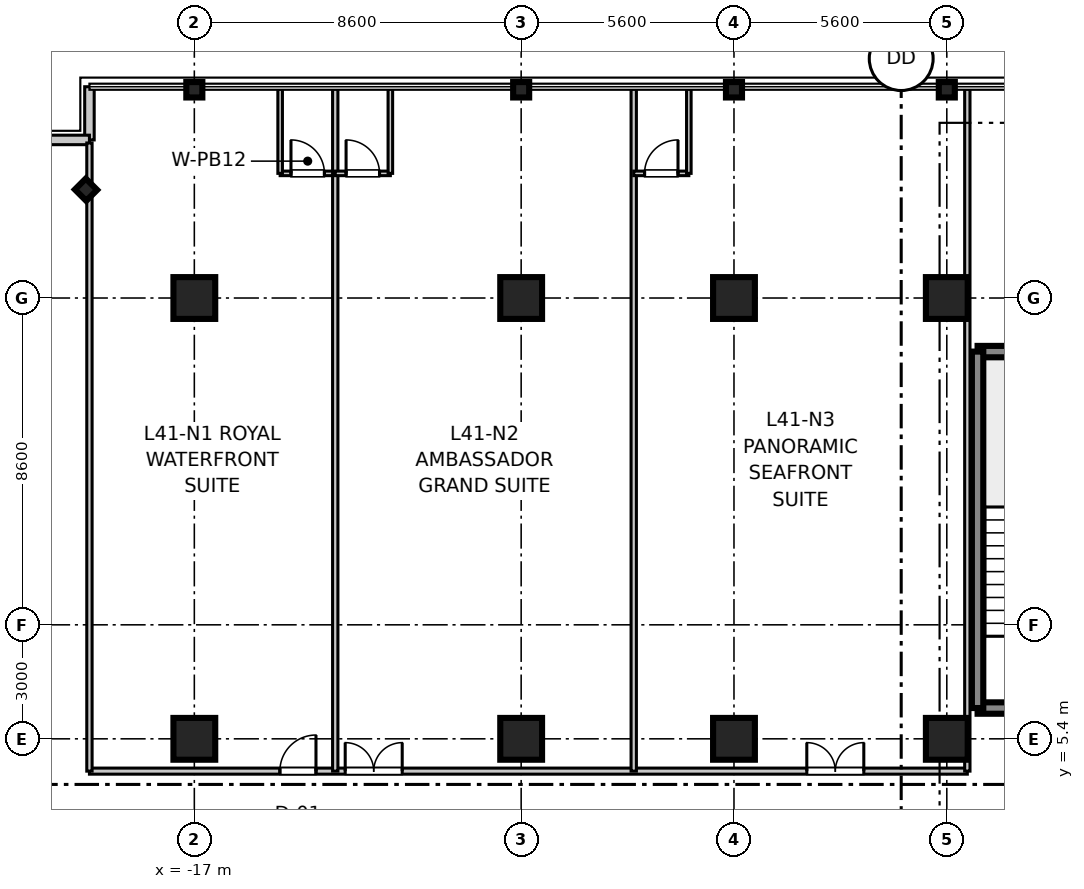
"""IFC4 building model, lengths in metres.
Left out: names, types, materials, properties, quantities, classifications, styles, units other than length and angle.
Written with IfcOpenShell. Run it as: python <this file> out.ifc"""

import sys

from ifc_helpers import new_model, si_unit, direction, frame, frame_2d, origin, origin_2d, place, context, subcontext, project, spatial, rectangle, i_section, extrude, source, transform, mapped, element, fill, save


model = new_model("IFC4")
c1 = context("Model", 3, precision=1e-05, world=origin(), true_north=direction((0.0, 1.0)))
c2 = subcontext(c1, "Body", "Model", "MODEL_VIEW")
j1 = project(units=[si_unit("LENGTHUNIT", "METRE"), si_unit("PLANEANGLEUNIT", "RADIAN")], contexts=[c1])
p1 = place(None, origin())
s1 = spatial("IfcSite", under=j1, at=p1, CompositionType="ELEMENT")
p2 = place(p1, origin())
s2 = spatial("IfcBuilding", under=s1, at=p2, CompositionType="ELEMENT")
p3 = place(p2, frame((0.0, 0.0, 163.6)))
s3 = spatial("IfcBuildingStorey", under=s2, at=p3, CompositionType="ELEMENT", Elevation=163.6)
m1 = source(origin(), c2, "Body", "SweptSolid", [
    extrude(rectangle(XDim=1.1, YDim=1.1, at=origin_2d()), origin(), (0.0, 0.0, 1.0), 3.605),
])
for number, where, z_axis, x_axis in (
    (1, (-17.0, 5.4, 0.0), (0.0, 0.0, 1.0), (1.0, 0.0, 0.0)),
    (2, (-17.0, 17.0, 0.0), (0.0, 0.0, 1.0), (1.0, 0.0, 0.0)),
    (3, (-8.4, 5.4, 0.0), (0.0, 0.0, 1.0), (1.0, 0.0, 0.0)),
    (4, (-8.4, 17.0, 0.0), (0.0, 0.0, 1.0), (1.0, 0.0, 0.0)),
    (5, (-2.8, 5.4, 0.0), (0.0, 0.0, 1.0), (1.0, 0.0, 0.0)),
    (6, (-2.8, 17.0, 0.0), (0.0, 0.0, 1.0), (1.0, 0.0, 0.0)),
    (7, (2.8, 5.4, 0.0), (0.0, 0.0, 1.0), (1.0, 0.0, 0.0)),
    (8, (2.8, 17.0, 0.0), (0.0, 0.0, 1.0), (1.0, 0.0, 0.0)),
):
    element("IfcColumn", number, at=place(p3, frame(where, z_axis=z_axis, x_axis=x_axis)), inside=s3, PredefinedType="COLUMN", context=c2, shape_type="MappedRepresentation", body=[
        mapped(m1, transform((0.0, 0.0, 0.0), scale=1.0)),
    ])
m2 = source(origin(), c2, "Body", "SweptSolid", [
    extrude(i_section(OverallWidth=0.406, OverallDepth=0.422, WebThickness=0.019, FlangeThickness=0.03, at=origin_2d()), origin(), (0.0, 0.0, 1.0), 3.605),
])
for number, where, z_axis, x_axis in (
    (9, (-17.0, 22.48, 0.0), (0.0, 0.0, 1.0), (0.0, 1.0, 0.0)),
    (10, (-8.4, 22.48, 0.0), (0.0, 0.0, 1.0), (0.0, 1.0, 0.0)),
    (11, (-2.8, 22.48, 0.0), (0.0, 0.0, 1.0), (0.0, 1.0, 0.0)),
    (12, (2.8, 22.48, 0.0), (0.0, 0.0, 1.0), (0.0, 1.0, 0.0)),
    (13, (-19.85, 19.85, 0.0), (0.0, 0.0, 1.0), (0.707, 0.707, 0.0)),
):
    element("IfcColumn", number, at=place(p3, frame(where, z_axis=z_axis, x_axis=x_axis)), inside=s3, PredefinedType="COLUMN", context=c2, shape_type="MappedRepresentation", body=[
        mapped(m2, transform((0.0, 0.0, 0.0), scale=1.0)),
    ])
m3 = source(origin(), c2, "Body", "SweptSolid", [
    extrude(rectangle(XDim=3.98, YDim=0.3, at=frame_2d((1.99, 0.0))), origin(), (0.0, 0.0, 1.0), 3.39),
])
for number, where, z_axis, x_axis in (
    (14, (3.61, 6.21, 0.0), (0.0, 0.0, 1.0), (1.0, 0.0, 0.0)),
    (15, (3.61, 15.59, 0.0), (0.0, 0.0, 1.0), (1.0, 0.0, 0.0)),
):
    element("IfcWall", number, at=place(p3, frame(where, z_axis=z_axis, x_axis=x_axis)), inside=s3, PredefinedType="SHEAR", context=c2, shape_type="MappedRepresentation", body=[
        mapped(m3, transform((0.0, 0.0, 0.0), scale=1.0)),
    ])
m4 = source(origin(), c2, "Body", "SweptSolid", [
    extrude(rectangle(XDim=9.38, YDim=0.3, at=frame_2d((4.69, 0.0))), origin(), (0.0, 0.0, 1.0), 3.39),
])
p4 = place(p3, frame((3.61, 6.21, 0.0), z_axis=(0.0, 0.0, 1.0), x_axis=(0.0, 1.0, 0.0)))
e16 = element("IfcWall", 16, at=p4, inside=s3, PredefinedType="SHEAR", context=c2, shape_type="MappedRepresentation", body=[
    mapped(m4, transform((0.0, 0.0, 0.0), scale=1.0)),
])
m5 = source(origin(), c2, "Body", "SweptSolid", [
    extrude(rectangle(XDim=1.4, YDim=0.25, at=frame_2d((0.7, 0.0))), origin(), (0.0, 0.0, 1.0), 3.39),
])
p5 = place(p3, frame((-19.76, 21.16, 0.0), z_axis=(0.0, 0.0, 1.0), x_axis=(0.0, 1.0, 0.0)))
e17 = element("IfcWall", 17, at=p5, inside=s3, PredefinedType="STANDARD", context=c2, shape_type="MappedRepresentation", body=[
    mapped(m5, transform((0.0, 0.0, 0.0), scale=1.0)),
])
m6 = source(origin(), c2, "Body", "SweptSolid", [
    extrude(rectangle(XDim=1.4, YDim=0.25, at=frame_2d((0.7, 0.0))), origin(), (0.0, 0.0, 1.0), 3.39),
])
p6 = place(p3, frame((-21.16, 21.16, 0.0), z_axis=(0.0, 0.0, 1.0), x_axis=(1.0, 0.0, 0.0)))
e18 = element("IfcWall", 18, at=p6, inside=s3, PredefinedType="STANDARD", context=c2, shape_type="MappedRepresentation", body=[
    mapped(m6, transform((0.0, 0.0, 0.0), scale=1.0)),
])
m7 = source(origin(), c2, "Body", "SweptSolid", [
    extrude(rectangle(XDim=23.1, YDim=0.16, at=frame_2d((11.55, 0.0))), origin(), (0.0, 0.0, 1.0), 2.73),
])
p7 = place(p3, frame((-19.76, 4.55, 0.0), z_axis=(0.0, 0.0, 1.0), x_axis=(1.0, 0.0, 0.0)))
e19 = element("IfcWall", 19, at=p7, inside=s3, PredefinedType="PARTITIONING", context=c2, shape_type="MappedRepresentation", body=[
    mapped(m7, transform((0.0, 0.0, 0.0), scale=1.0)),
])
p8 = place(p7, frame((5.011, 0.0, 0.0)))
e20 = element("IfcOpeningElement", 20, at=p8, cuts=e19, PredefinedType="OPENING", context=c2, shape_type="SweptSolid", body=[
    extrude(rectangle(XDim=0.95, YDim=2.1, at=frame_2d((0.475, 1.05))), frame((0.0, 0.09, 0.0), z_axis=(0.0, -1.0, 0.0), x_axis=(1.0, 0.0, 0.0)), (0.0, 0.0, 1.0), 0.18),
])
p9 = place(p7, frame((6.73, 0.0, 0.0)))
e21 = element("IfcOpeningElement", 21, at=p9, cuts=e19, PredefinedType="OPENING", context=c2, shape_type="SweptSolid", body=[
    extrude(rectangle(XDim=1.5, YDim=2.15, at=frame_2d((0.75, 1.075))), frame((0.0, 0.09, 0.0), z_axis=(0.0, -1.0, 0.0), x_axis=(1.0, 0.0, 0.0)), (0.0, 0.0, 1.0), 0.18),
])
p10 = place(p7, frame((18.876, 0.0, 0.0)))
e22 = element("IfcOpeningElement", 22, at=p10, cuts=e19, PredefinedType="OPENING", context=c2, shape_type="SweptSolid", body=[
    extrude(rectangle(XDim=1.5, YDim=2.15, at=frame_2d((0.75, 1.075))), frame((0.0, 0.09, 0.0), z_axis=(0.0, -1.0, 0.0), x_axis=(1.0, 0.0, 0.0)), (0.0, 0.0, 1.0), 0.18),
])
m8 = source(origin(), c2, "Body", "SweptSolid", [
    extrude(rectangle(XDim=16.53, YDim=0.14, at=frame_2d((8.265, 0.0))), origin(), (0.0, 0.0, 1.0), 2.73),
])
p11 = place(p3, frame((-19.76, 4.55, 0.0), z_axis=(0.0, 0.0, 1.0), x_axis=(0.0, 1.0, 0.0)))
e23 = element("IfcWall", 23, at=p11, inside=s3, PredefinedType="PARTITIONING", context=c2, shape_type="MappedRepresentation", body=[
    mapped(m8, transform((0.0, 0.0, 0.0), scale=1.0)),
])
m9 = source(origin(), c2, "Body", "SweptSolid", [
    extrude(rectangle(XDim=17.95, YDim=0.14, at=frame_2d((8.975, 0.0))), origin(), (0.0, 0.0, 1.0), 2.73),
])
p12 = place(p3, frame((3.34, 4.55, 0.0), z_axis=(0.0, 0.0, 1.0), x_axis=(0.0, 1.0, 0.0)))
e24 = element("IfcWall", 24, at=p12, inside=s3, PredefinedType="PARTITIONING", context=c2, shape_type="MappedRepresentation", body=[
    mapped(m9, transform((0.0, 0.0, 0.0), scale=1.0)),
])
m10 = source(origin(), c2, "Body", "SweptSolid", [
    extrude(rectangle(XDim=1.45, YDim=0.12, at=frame_2d((0.725, 0.0))), origin(), (0.0, 0.0, 1.0), 2.73),
])
p13 = place(p3, frame((-14.742, 20.28, 0.0), z_axis=(0.0, 0.0, 1.0), x_axis=(1.0, 0.0, 0.0)))
e25 = element("IfcWall", 25, at=p13, inside=s3, PredefinedType="PARTITIONING", context=c2, shape_type="MappedRepresentation", body=[
    mapped(m10, transform((0.0, 0.0, 0.0), scale=1.0)),
])
p14 = place(p13, frame((0.285, 0.0, 0.0)))
e26 = element("IfcOpeningElement", 26, at=p14, cuts=e25, PredefinedType="OPENING", context=c2, shape_type="SweptSolid", body=[
    extrude(rectangle(XDim=0.88, YDim=2.1, at=frame_2d((0.44, 1.05))), frame((0.0, 0.07, 0.0), z_axis=(0.0, -1.0, 0.0), x_axis=(1.0, 0.0, 0.0)), (0.0, 0.0, 1.0), 0.14),
])
m11 = source(origin(), c2, "Body", "SweptSolid", [
    extrude(rectangle(XDim=2.22, YDim=0.12, at=frame_2d((1.11, 0.0))), origin(), (0.0, 0.0, 1.0), 2.73),
])
p15 = place(p3, frame((-14.742, 20.28, 0.0), z_axis=(0.0, 0.0, 1.0), x_axis=(0.0, 1.0, 0.0)))
e27 = element("IfcWall", 27, at=p15, inside=s3, PredefinedType="PARTITIONING", context=c2, shape_type="MappedRepresentation", body=[
    mapped(m11, transform((0.0, 0.0, 0.0), scale=1.0)),
])
p16 = place(p3, frame((-13.292, 4.55, 0.0), z_axis=(0.0, 0.0, 1.0), x_axis=(0.0, 1.0, 0.0)))
e28 = element("IfcWall", 28, at=p16, inside=s3, PredefinedType="PARTITIONING", context=c2, shape_type="MappedRepresentation", body=[
    mapped(m9, transform((0.0, 0.0, 0.0), scale=1.0)),
])
p17 = place(p3, frame((-13.292, 20.28, 0.0), z_axis=(0.0, 0.0, 1.0), x_axis=(1.0, 0.0, 0.0)))
e29 = element("IfcWall", 29, at=p17, inside=s3, PredefinedType="PARTITIONING", context=c2, shape_type="MappedRepresentation", body=[
    mapped(m10, transform((0.0, 0.0, 0.0), scale=1.0)),
])
p18 = place(p17, frame((0.285, 0.0, 0.0)))
e30 = element("IfcOpeningElement", 30, at=p18, cuts=e29, PredefinedType="OPENING", context=c2, shape_type="SweptSolid", body=[
    extrude(rectangle(XDim=0.88, YDim=2.1, at=frame_2d((0.44, 1.05))), frame((0.0, 0.07, 0.0), z_axis=(0.0, -1.0, 0.0), x_axis=(1.0, 0.0, 0.0)), (0.0, 0.0, 1.0), 0.14),
])
p19 = place(p3, frame((-11.842, 20.28, 0.0), z_axis=(0.0, 0.0, 1.0), x_axis=(0.0, 1.0, 0.0)))
e31 = element("IfcWall", 31, at=p19, inside=s3, PredefinedType="PARTITIONING", context=c2, shape_type="MappedRepresentation", body=[
    mapped(m11, transform((0.0, 0.0, 0.0), scale=1.0)),
])
p20 = place(p3, frame((-5.438, 4.55, 0.0), z_axis=(0.0, 0.0, 1.0), x_axis=(0.0, 1.0, 0.0)))
e32 = element("IfcWall", 32, at=p20, inside=s3, PredefinedType="PARTITIONING", context=c2, shape_type="MappedRepresentation", body=[
    mapped(m9, transform((0.0, 0.0, 0.0), scale=1.0)),
])
p21 = place(p3, frame((-5.438, 20.28, 0.0), z_axis=(0.0, 0.0, 1.0), x_axis=(1.0, 0.0, 0.0)))
e33 = element("IfcWall", 33, at=p21, inside=s3, PredefinedType="PARTITIONING", context=c2, shape_type="MappedRepresentation", body=[
    mapped(m10, transform((0.0, 0.0, 0.0), scale=1.0)),
])
p22 = place(p21, frame((0.285, 0.0, 0.0)))
e34 = element("IfcOpeningElement", 34, at=p22, cuts=e33, PredefinedType="OPENING", context=c2, shape_type="SweptSolid", body=[
    extrude(rectangle(XDim=0.88, YDim=2.1, at=frame_2d((0.44, 1.05))), frame((0.0, 0.07, 0.0), z_axis=(0.0, -1.0, 0.0), x_axis=(1.0, 0.0, 0.0)), (0.0, 0.0, 1.0), 0.14),
])
p23 = place(p3, frame((-3.988, 20.28, 0.0), z_axis=(0.0, 0.0, 1.0), x_axis=(0.0, 1.0, 0.0)))
e35 = element("IfcWall", 35, at=p23, inside=s3, PredefinedType="PARTITIONING", context=c2, shape_type="MappedRepresentation", body=[
    mapped(m11, transform((0.0, 0.0, 0.0), scale=1.0)),
])
m12 = source(origin(), c2, "Body", "SweptSolid", [
    extrude(rectangle(XDim=0.88, YDim=2.1, at=frame_2d((0.44, 1.05))), frame((0.0, 0.025, 0.0), z_axis=(0.0, -1.0, 0.0), x_axis=(1.0, 0.0, 0.0)), (0.0, 0.0, 1.0), 0.05),
])
p24 = place(p14, origin())
e36 = element("IfcDoor", 36, at=p24, inside=s3, OperationType="SINGLE_SWING_LEFT", PredefinedType="DOOR", context=c2, shape_type="MappedRepresentation", body=[
    mapped(m12, transform((0.0, 0.0, 0.0), scale=1.0)),
])
fill(e26, e36)
m13 = source(origin(), c2, "Body", "SweptSolid", [
    extrude(rectangle(XDim=0.95, YDim=2.1, at=frame_2d((0.475, 1.05))), frame((0.0, 0.025, 0.0), z_axis=(0.0, -1.0, 0.0), x_axis=(1.0, 0.0, 0.0)), (0.0, 0.0, 1.0), 0.05),
])
p25 = place(p8, origin())
e37 = element("IfcDoor", 37, at=p25, inside=s3, OperationType="SINGLE_SWING_RIGHT", PredefinedType="DOOR", context=c2, shape_type="MappedRepresentation", body=[
    mapped(m13, transform((0.0, 0.0, 0.0), scale=1.0)),
])
fill(e20, e37)
p26 = place(p18, origin())
e38 = element("IfcDoor", 38, at=p26, inside=s3, OperationType="SINGLE_SWING_LEFT", PredefinedType="DOOR", context=c2, shape_type="MappedRepresentation", body=[
    mapped(m12, transform((0.0, 0.0, 0.0), scale=1.0)),
])
fill(e30, e38)
m14 = source(origin(), c2, "Body", "SweptSolid", [
    extrude(rectangle(XDim=1.5, YDim=2.15, at=frame_2d((0.75, 1.075))), frame((0.0, 0.025, 0.0), z_axis=(0.0, -1.0, 0.0), x_axis=(1.0, 0.0, 0.0)), (0.0, 0.0, 1.0), 0.05),
])
p27 = place(p9, origin())
e39 = element("IfcDoor", 39, at=p27, inside=s3, OperationType="DOUBLE_DOOR_SINGLE_SWING", PredefinedType="DOOR", context=c2, shape_type="MappedRepresentation", body=[
    mapped(m14, transform((0.0, 0.0, 0.0), scale=1.0)),
])
fill(e21, e39)
p28 = place(p22, origin())
e40 = element("IfcDoor", 40, at=p28, inside=s3, OperationType="SINGLE_SWING_RIGHT", PredefinedType="DOOR", context=c2, shape_type="MappedRepresentation", body=[
    mapped(m12, transform((0.0, 0.0, 0.0), scale=1.0)),
])
fill(e34, e40)
p29 = place(p10, origin())
e41 = element("IfcDoor", 41, at=p29, inside=s3, OperationType="DOUBLE_DOOR_SINGLE_SWING", PredefinedType="DOOR", context=c2, shape_type="MappedRepresentation", body=[
    mapped(m14, transform((0.0, 0.0, 0.0), scale=1.0)),
])
fill(e22, e41)
save(model, sys.argv[1])
